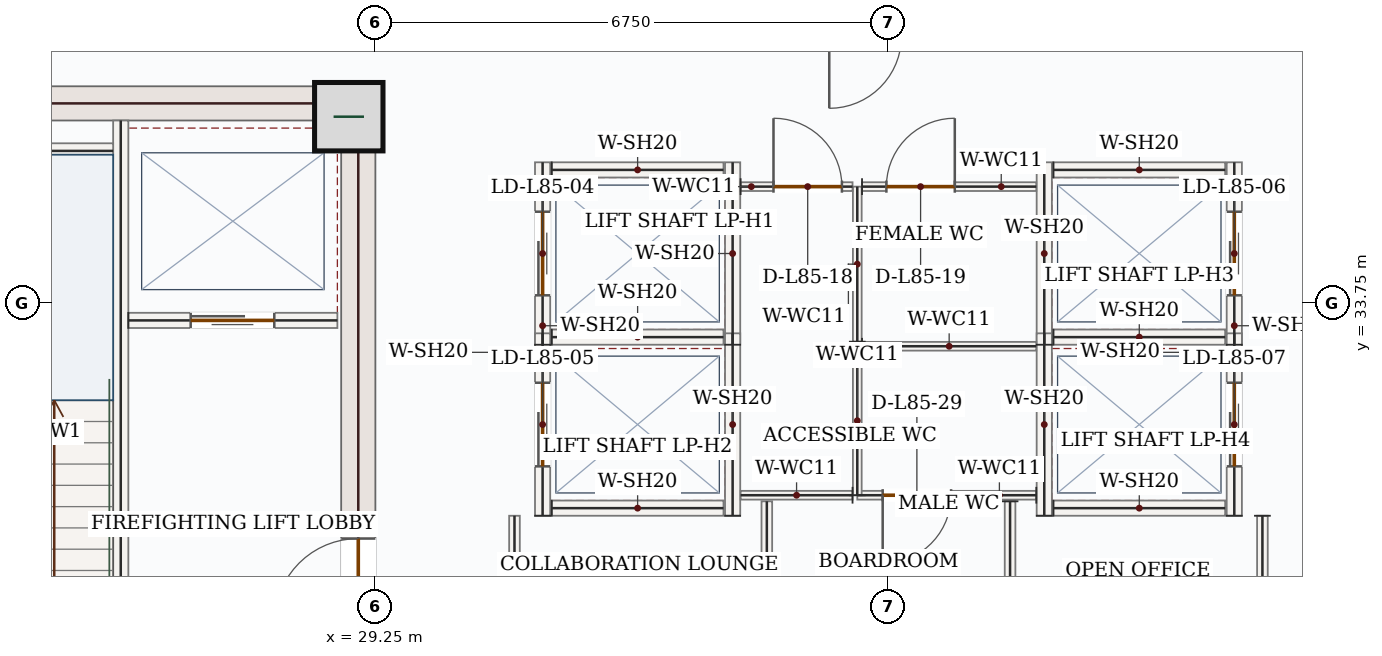
"""IFC4 building model, lengths in metres.
Left out: names, types, materials, properties, quantities, classifications, styles, units other than length and angle.
Written with IfcOpenShell. Run it as: python <this file> out.ifc"""

import sys

from ifc_helpers import new_model, si_unit, direction, frame, frame_2d, origin, origin_2d, place, context, subcontext, project, spatial, rectangle, extrude, source, transform, mapped, element, fill, save


model = new_model("IFC4")
c1 = context("Model", 3, precision=1e-05, world=origin(), true_north=direction((0.0, 1.0)))
c2 = subcontext(c1, "Body", "Model", "MODEL_VIEW")
j1 = project(units=[si_unit("LENGTHUNIT", "METRE"), si_unit("PLANEANGLEUNIT", "RADIAN")], contexts=[c1])
p1 = place(None, origin())
s1 = spatial("IfcSite", under=j1, at=p1, CompositionType="ELEMENT")
p2 = place(p1, origin())
s2 = spatial("IfcBuilding", under=s1, at=p2, CompositionType="ELEMENT")
p3 = place(p2, frame((0.0, 0.0, 349.8)))
s3 = spatial("IfcBuildingStorey", under=s2, at=p3, CompositionType="ELEMENT", Elevation=349.8)
p4 = place(p3, frame((29.025, 28.05, 0.0), z_axis=(0.0, 0.0, 1.0), x_axis=(0.0, 1.0, 0.0)))
e1 = element("IfcWall", 1, at=p4, inside=s3, PredefinedType="SHEAR", context=c2, shape_type="SweptSolid", body=[
    extrude(rectangle(XDim=8.55, YDim=0.45, at=frame_2d((4.275, 0.0))), origin(), (0.0, 0.0, 1.0), 3.5),
])
p5 = place(p4, frame((1.5, 0.0, 0.0)))
e2 = element("IfcOpeningElement", 2, at=p5, cuts=e1, PredefinedType="OPENING", context=c2, shape_type="SweptSolid", body=[
    extrude(rectangle(XDim=1.1, YDim=2.2, at=frame_2d((0.55, 1.1))), frame((0.0, 0.235, 0.0), z_axis=(0.0, -1.0, 0.0), x_axis=(1.0, 0.0, 0.0)), (0.0, 0.0, 1.0), 0.47),
])
m1 = source(origin(), c2, "Body", "SweptSolid", [
    extrude(rectangle(XDim=7.1, YDim=0.45, at=frame_2d((3.55, 0.0))), origin(), (0.0, 0.0, 1.0), 3.5),
])
p6 = place(p3, frame((21.7, 36.375, 0.0), z_axis=(0.0, 0.0, 1.0), x_axis=(1.0, 0.0, 0.0)))
e3 = element("IfcWall", 3, at=p6, inside=s3, PredefinedType="SHEAR", context=c2, shape_type="MappedRepresentation", body=[
    mapped(m1, transform((0.0, 0.0, 0.0), x_axis=(1.0, 0.0, 0.0), y_axis=(0.0, 1.0, 0.0), z_axis=(0.0, 0.0, 1.0), scale=1.0)),
])
m2 = source(origin(), c2, "Body", "SweptSolid", [
    extrude(rectangle(XDim=0.9, YDim=0.9, at=origin_2d()), origin(), (0.0, 0.0, 1.0), 3.75),
])
p7 = place(p3, frame((28.9, 36.2, 0.0), z_axis=(0.0, 0.0, 1.0), x_axis=(1.0, 0.0, 0.0)))
e4 = element("IfcColumn", 4, at=p7, inside=s3, PredefinedType="COLUMN", context=c2, shape_type="MappedRepresentation", body=[
    mapped(m2, transform((0.0, 0.0, 0.0), x_axis=(1.0, 0.0, 0.0), y_axis=(0.0, 1.0, 0.0), z_axis=(0.0, 0.0, 1.0), scale=1.0)),
])
p8 = place(p3, frame((25.9, 28.15, 0.0), z_axis=(0.0, 0.0, 1.0), x_axis=(0.0, 1.0, 0.0)))
e5 = element("IfcWall", 5, at=p8, inside=s3, PredefinedType="SOLIDWALL", context=c2, shape_type="SweptSolid", body=[
    extrude(rectangle(XDim=8.0, YDim=0.2, at=frame_2d((4.0, 0.0))), origin(), (0.0, 0.0, 1.0), 3.5),
])
p9 = place(p8, frame((0.4, 0.0, 0.0)))
e6 = element("IfcOpeningElement", 6, at=p9, cuts=e5, PredefinedType="OPENING", context=c2, shape_type="SweptSolid", body=[
    extrude(rectangle(XDim=1.05, YDim=2.15, at=frame_2d((0.525, 1.075))), frame((0.0, 0.11, 0.0), z_axis=(0.0, -1.0, 0.0), x_axis=(1.0, 0.0, 0.0)), (0.0, 0.0, 1.0), 0.22),
])
m3 = source(origin(), c2, "Body", "SweptSolid", [
    extrude(rectangle(XDim=3.25, YDim=0.2, at=frame_2d((1.625, 0.0))), origin(), (0.0, 0.0, 1.0), 3.5),
])
p10 = place(p3, frame((22.55, 35.75, 0.0), z_axis=(0.0, 0.0, 1.0), x_axis=(1.0, 0.0, 0.0)))
e7 = element("IfcWall", 7, at=p10, inside=s3, PredefinedType="SOLIDWALL", context=c2, shape_type="MappedRepresentation", body=[
    mapped(m3, transform((0.0, 0.0, 0.0), x_axis=(1.0, 0.0, 0.0), y_axis=(0.0, 1.0, 0.0), z_axis=(0.0, 0.0, 1.0), scale=1.0)),
])
p11 = place(p3, frame((26.0, 33.52, 0.0), z_axis=(0.0, 0.0, 1.0), x_axis=(1.0, 0.0, 0.0)))
e8 = element("IfcWall", 8, at=p11, inside=s3, PredefinedType="SOLIDWALL", context=c2, shape_type="SweptSolid", body=[
    extrude(rectangle(XDim=2.75, YDim=0.2, at=frame_2d((1.375, 0.0))), origin(), (0.0, 0.0, 1.0), 3.5),
])
p12 = place(p11, frame((0.82, 0.0, 0.0)))
e9 = element("IfcOpeningElement", 9, at=p12, cuts=e8, PredefinedType="OPENING", context=c2, shape_type="SweptSolid", body=[
    extrude(rectangle(XDim=1.1, YDim=2.15, at=frame_2d((0.55, 1.075))), frame((0.0, 0.11, 0.0), z_axis=(0.0, -1.0, 0.0), x_axis=(1.0, 0.0, 0.0)), (0.0, 0.0, 1.0), 0.22),
])
p13 = place(p3, frame((31.45, 33.2, 0.0), z_axis=(0.0, 0.0, 1.0), x_axis=(0.0, 1.0, 0.0)))
e10 = element("IfcWall", 10, at=p13, inside=s3, PredefinedType="SOLIDWALL", context=c2, shape_type="SweptSolid", body=[
    extrude(rectangle(XDim=2.4, YDim=0.2, at=frame_2d((1.2, 0.0))), origin(), (0.0, 0.0, 1.0), 3.5),
])
p14 = place(p13, frame((0.65, 0.0, 0.0)))
e11 = element("IfcOpeningElement", 11, at=p14, cuts=e10, PredefinedType="OPENING", context=c2, shape_type="SweptSolid", body=[
    extrude(rectangle(XDim=1.1, YDim=2.15, at=frame_2d((0.55, 1.075))), frame((0.0, 0.11, 0.0), z_axis=(0.0, -1.0, 0.0), x_axis=(1.0, 0.0, 0.0)), (0.0, 0.0, 1.0), 0.22),
])
m4 = source(origin(), c2, "Body", "SweptSolid", [
    extrude(rectangle(XDim=2.4, YDim=0.2, at=frame_2d((1.2, 0.0))), origin(), (0.0, 0.0, 1.0), 3.5),
])
p15 = place(p3, frame((33.95, 33.2, 0.0), z_axis=(0.0, 0.0, 1.0), x_axis=(0.0, 1.0, 0.0)))
e12 = element("IfcWall", 12, at=p15, inside=s3, PredefinedType="SOLIDWALL", context=c2, shape_type="MappedRepresentation", body=[
    mapped(m4, transform((0.0, 0.0, 0.0), x_axis=(1.0, 0.0, 0.0), y_axis=(0.0, 1.0, 0.0), z_axis=(0.0, 0.0, 1.0), scale=1.0)),
])
m5 = source(origin(), c2, "Body", "SweptSolid", [
    extrude(rectangle(XDim=2.26, YDim=0.2, at=frame_2d((1.13, 0.0))), origin(), (0.0, 0.0, 1.0), 3.5),
])
for number, where, z_axis, x_axis in (
    (13, (31.57, 33.3, 0.0), (0.0, 0.0, 1.0), (1.0, 0.0, 0.0)),
    (14, (31.57, 35.5, 0.0), (0.0, 0.0, 1.0), (1.0, 0.0, 0.0)),
):
    element("IfcWall", number, at=place(p3, frame(where, z_axis=z_axis, x_axis=x_axis)), inside=s3, PredefinedType="SOLIDWALL", context=c2, shape_type="MappedRepresentation", body=[
        mapped(m5, transform((0.0, 0.0, 0.0), x_axis=(1.0, 0.0, 0.0), y_axis=(0.0, 1.0, 0.0), z_axis=(0.0, 0.0, 1.0), scale=1.0)),
    ])
p16 = place(p3, frame((31.45, 30.95, 0.0), z_axis=(0.0, 0.0, 1.0), x_axis=(0.0, 1.0, 0.0)))
e15 = element("IfcWall", 15, at=p16, inside=s3, PredefinedType="SOLIDWALL", context=c2, shape_type="SweptSolid", body=[
    extrude(rectangle(XDim=2.4, YDim=0.2, at=frame_2d((1.2, 0.0))), origin(), (0.0, 0.0, 1.0), 3.5),
])
p17 = place(p16, frame((0.65, 0.0, 0.0)))
e16 = element("IfcOpeningElement", 16, at=p17, cuts=e15, PredefinedType="OPENING", context=c2, shape_type="SweptSolid", body=[
    extrude(rectangle(XDim=1.1, YDim=2.15, at=frame_2d((0.55, 1.075))), frame((0.0, 0.11, 0.0), z_axis=(0.0, -1.0, 0.0), x_axis=(1.0, 0.0, 0.0)), (0.0, 0.0, 1.0), 0.22),
])
p18 = place(p3, frame((33.95, 30.95, 0.0), z_axis=(0.0, 0.0, 1.0), x_axis=(0.0, 1.0, 0.0)))
e17 = element("IfcWall", 17, at=p18, inside=s3, PredefinedType="SOLIDWALL", context=c2, shape_type="MappedRepresentation", body=[
    mapped(m4, transform((0.0, 0.0, 0.0), x_axis=(1.0, 0.0, 0.0), y_axis=(0.0, 1.0, 0.0), z_axis=(0.0, 0.0, 1.0), scale=1.0)),
])
p19 = place(p3, frame((31.57, 31.05, 0.0), z_axis=(0.0, 0.0, 1.0), x_axis=(1.0, 0.0, 0.0)))
e18 = element("IfcWall", 18, at=p19, inside=s3, PredefinedType="SOLIDWALL", context=c2, shape_type="MappedRepresentation", body=[
    mapped(m5, transform((0.0, 0.0, 0.0), x_axis=(1.0, 0.0, 0.0), y_axis=(0.0, 1.0, 0.0), z_axis=(0.0, 0.0, 1.0), scale=1.0)),
])
p20 = place(p3, frame((38.05, 33.2, 0.0), z_axis=(0.0, 0.0, 1.0), x_axis=(0.0, 1.0, 0.0)))
e19 = element("IfcWall", 19, at=p20, inside=s3, PredefinedType="SOLIDWALL", context=c2, shape_type="MappedRepresentation", body=[
    mapped(m4, transform((0.0, 0.0, 0.0), x_axis=(1.0, 0.0, 0.0), y_axis=(0.0, 1.0, 0.0), z_axis=(0.0, 0.0, 1.0), scale=1.0)),
])
p21 = place(p3, frame((40.55, 33.2, 0.0), z_axis=(0.0, 0.0, 1.0), x_axis=(0.0, 1.0, 0.0)))
e20 = element("IfcWall", 20, at=p21, inside=s3, PredefinedType="SOLIDWALL", context=c2, shape_type="SweptSolid", body=[
    extrude(rectangle(XDim=2.4, YDim=0.2, at=frame_2d((1.2, 0.0))), origin(), (0.0, 0.0, 1.0), 3.5),
])
p22 = place(p21, frame((0.65, 0.0, 0.0)))
e21 = element("IfcOpeningElement", 21, at=p22, cuts=e20, PredefinedType="OPENING", context=c2, shape_type="SweptSolid", body=[
    extrude(rectangle(XDim=1.1, YDim=2.15, at=frame_2d((0.55, 1.075))), frame((0.0, 0.11, 0.0), z_axis=(0.0, -1.0, 0.0), x_axis=(1.0, 0.0, 0.0)), (0.0, 0.0, 1.0), 0.22),
])
for number, where, z_axis, x_axis in (
    (22, (38.17, 33.3, 0.0), (0.0, 0.0, 1.0), (1.0, 0.0, 0.0)),
    (23, (38.17, 35.5, 0.0), (0.0, 0.0, 1.0), (1.0, 0.0, 0.0)),
):
    element("IfcWall", number, at=place(p3, frame(where, z_axis=z_axis, x_axis=x_axis)), inside=s3, PredefinedType="SOLIDWALL", context=c2, shape_type="MappedRepresentation", body=[
        mapped(m5, transform((0.0, 0.0, 0.0), x_axis=(1.0, 0.0, 0.0), y_axis=(0.0, 1.0, 0.0), z_axis=(0.0, 0.0, 1.0), scale=1.0)),
    ])
p23 = place(p3, frame((38.05, 30.95, 0.0), z_axis=(0.0, 0.0, 1.0), x_axis=(0.0, 1.0, 0.0)))
e24 = element("IfcWall", 24, at=p23, inside=s3, PredefinedType="SOLIDWALL", context=c2, shape_type="MappedRepresentation", body=[
    mapped(m4, transform((0.0, 0.0, 0.0), x_axis=(1.0, 0.0, 0.0), y_axis=(0.0, 1.0, 0.0), z_axis=(0.0, 0.0, 1.0), scale=1.0)),
])
p24 = place(p3, frame((40.55, 30.95, 0.0), z_axis=(0.0, 0.0, 1.0), x_axis=(0.0, 1.0, 0.0)))
e25 = element("IfcWall", 25, at=p24, inside=s3, PredefinedType="SOLIDWALL", context=c2, shape_type="SweptSolid", body=[
    extrude(rectangle(XDim=2.4, YDim=0.2, at=frame_2d((1.2, 0.0))), origin(), (0.0, 0.0, 1.0), 3.5),
])
p25 = place(p24, frame((0.65, 0.0, 0.0)))
e26 = element("IfcOpeningElement", 26, at=p25, cuts=e25, PredefinedType="OPENING", context=c2, shape_type="SweptSolid", body=[
    extrude(rectangle(XDim=1.1, YDim=2.15, at=frame_2d((0.55, 1.075))), frame((0.0, 0.11, 0.0), z_axis=(0.0, -1.0, 0.0), x_axis=(1.0, 0.0, 0.0)), (0.0, 0.0, 1.0), 0.22),
])
p26 = place(p3, frame((38.17, 31.05, 0.0), z_axis=(0.0, 0.0, 1.0), x_axis=(1.0, 0.0, 0.0)))
e27 = element("IfcWall", 27, at=p26, inside=s3, PredefinedType="SOLIDWALL", context=c2, shape_type="MappedRepresentation", body=[
    mapped(m5, transform((0.0, 0.0, 0.0), x_axis=(1.0, 0.0, 0.0), y_axis=(0.0, 1.0, 0.0), z_axis=(0.0, 0.0, 1.0), scale=1.0)),
])
p27 = place(p3, frame((37.945, 31.22, 0.0), z_axis=(0.0, 0.0, 1.0), x_axis=(-1.0, 0.0, 0.0)))
e28 = element("IfcWall", 28, at=p27, inside=s3, PredefinedType="PARTITIONING", context=c2, shape_type="SweptSolid", body=[
    extrude(rectangle(XDim=2.355, YDim=0.115, at=frame_2d((1.177, 0.0))), origin(), (0.0, 0.0, 1.0), 3.5),
])
p28 = place(p27, frame((1.121, 0.0, 0.0)))
e29 = element("IfcOpeningElement", 29, at=p28, cuts=e28, PredefinedType="OPENING", context=c2, shape_type="SweptSolid", body=[
    extrude(rectangle(XDim=0.9, YDim=2.1, at=frame_2d((0.45, 1.05))), frame((0.0, 0.067, 0.0), z_axis=(0.0, -1.0, 0.0), x_axis=(1.0, 0.0, 0.0)), (0.0, 0.0, 1.0), 0.135),
])
m6 = source(origin(), c2, "Body", "SweptSolid", [
    extrude(rectangle(XDim=1.96, YDim=0.115, at=frame_2d((0.98, 0.0))), origin(), (0.0, 0.0, 1.0), 3.5),
])
p29 = place(p3, frame((35.59, 31.22, 0.0), z_axis=(0.0, 0.0, 1.0), x_axis=(0.0, 1.0, 0.0)))
e30 = element("IfcWall", 30, at=p29, inside=s3, PredefinedType="PARTITIONING", context=c2, shape_type="MappedRepresentation", body=[
    mapped(m6, transform((0.0, 0.0, 0.0), x_axis=(1.0, 0.0, 0.0), y_axis=(0.0, 1.0, 0.0), z_axis=(0.0, 0.0, 1.0), scale=1.0)),
])
m7 = source(origin(), c2, "Body", "SweptSolid", [
    extrude(rectangle(XDim=2.292, YDim=0.115, at=frame_2d((1.146, 0.0))), origin(), (0.0, 0.0, 1.0), 3.5),
])
p30 = place(p3, frame((35.653, 33.18, 0.0), z_axis=(0.0, 0.0, 1.0), x_axis=(1.0, 0.0, 0.0)))
e31 = element("IfcWall", 31, at=p30, inside=s3, PredefinedType="PARTITIONING", context=c2, shape_type="MappedRepresentation", body=[
    mapped(m7, transform((0.0, 0.0, 0.0), x_axis=(1.0, 0.0, 0.0), y_axis=(0.0, 1.0, 0.0), z_axis=(0.0, 0.0, 1.0), scale=1.0)),
])
m8 = source(origin(), c2, "Body", "SweptSolid", [
    extrude(rectangle(XDim=2.04, YDim=0.115, at=frame_2d((1.02, 0.0))), origin(), (0.0, 0.0, 1.0), 3.5),
])
p31 = place(p3, frame((35.59, 33.24, 0.0), z_axis=(0.0, 0.0, 1.0), x_axis=(0.0, 1.0, 0.0)))
e32 = element("IfcWall", 32, at=p31, inside=s3, PredefinedType="PARTITIONING", context=c2, shape_type="MappedRepresentation", body=[
    mapped(m8, transform((0.0, 0.0, 0.0), x_axis=(1.0, 0.0, 0.0), y_axis=(0.0, 1.0, 0.0), z_axis=(0.0, 0.0, 1.0), scale=1.0)),
])
p32 = place(p3, frame((35.653, 35.28, 0.0), z_axis=(0.0, 0.0, 1.0), x_axis=(1.0, 0.0, 0.0)))
e33 = element("IfcWall", 33, at=p32, inside=s3, PredefinedType="PARTITIONING", context=c2, shape_type="SweptSolid", body=[
    extrude(rectangle(XDim=2.292, YDim=0.115, at=frame_2d((1.146, 0.0))), origin(), (0.0, 0.0, 1.0), 3.5),
])
p33 = place(p32, frame((0.32, 0.0, 0.0)))
e34 = element("IfcOpeningElement", 34, at=p33, cuts=e33, PredefinedType="OPENING", context=c2, shape_type="SweptSolid", body=[
    extrude(rectangle(XDim=0.9, YDim=2.1, at=frame_2d((0.45, 1.05))), frame((0.0, 0.067, 0.0), z_axis=(0.0, -1.0, 0.0), x_axis=(1.0, 0.0, 0.0)), (0.0, 0.0, 1.0), 0.135),
])
m9 = source(origin(), c2, "Body", "SweptSolid", [
    extrude(rectangle(XDim=1.473, YDim=0.115, at=frame_2d((0.736, 0.0))), origin(), (0.0, 0.0, 1.0), 3.5),
])
p34 = place(p3, frame((35.528, 31.22, 0.0), z_axis=(0.0, 0.0, 1.0), x_axis=(-1.0, 0.0, 0.0)))
e35 = element("IfcWall", 35, at=p34, inside=s3, PredefinedType="PARTITIONING", context=c2, shape_type="MappedRepresentation", body=[
    mapped(m9, transform((0.0, 0.0, 0.0), x_axis=(1.0, 0.0, 0.0), y_axis=(0.0, 1.0, 0.0), z_axis=(0.0, 0.0, 1.0), scale=1.0)),
])
p35 = place(p3, frame((34.055, 35.28, 0.0), z_axis=(0.0, 0.0, 1.0), x_axis=(1.0, 0.0, 0.0)))
e36 = element("IfcWall", 36, at=p35, inside=s3, PredefinedType="PARTITIONING", context=c2, shape_type="SweptSolid", body=[
    extrude(rectangle(XDim=1.473, YDim=0.115, at=frame_2d((0.736, 0.0))), origin(), (0.0, 0.0, 1.0), 3.5),
])
p36 = place(p35, frame((0.433, 0.0, 0.0)))
e37 = element("IfcOpeningElement", 37, at=p36, cuts=e36, PredefinedType="OPENING", context=c2, shape_type="SweptSolid", body=[
    extrude(rectangle(XDim=0.9, YDim=2.1, at=frame_2d((0.45, 1.05))), frame((0.0, 0.067, 0.0), z_axis=(0.0, -1.0, 0.0), x_axis=(1.0, 0.0, 0.0)), (0.0, 0.0, 1.0), 0.135),
])
m10 = source(origin(), c2, "Body", "SweptSolid", [
    extrude(rectangle(XDim=3.2, YDim=0.14, at=frame_2d((1.6, 0.0))), origin(), (0.0, 0.0, 1.0), 3.5),
])
for number, where, z_axis, x_axis in (
    (38, (34.4, 27.94, 0.0), (0.0, 0.0, 1.0), (0.0, 1.0, 0.0)),
    (39, (37.6, 31.14, 0.0), (0.0, 0.0, 1.0), (0.0, -1.0, 0.0)),
):
    element("IfcWall", number, at=place(p3, frame(where, z_axis=z_axis, x_axis=x_axis)), inside=s3, PredefinedType="PARTITIONING", context=c2, shape_type="MappedRepresentation", body=[
        mapped(m10, transform((0.0, 0.0, 0.0), x_axis=(1.0, 0.0, 0.0), y_axis=(0.0, 1.0, 0.0), z_axis=(0.0, 0.0, 1.0), scale=1.0)),
    ])
m11 = source(origin(), c2, "Body", "SweptSolid", [
    extrude(rectangle(XDim=2.935, YDim=0.14, at=frame_2d((1.468, 0.0))), origin(), (0.0, 0.0, 1.0), 3.5),
])
p37 = place(p3, frame((31.08, 28.015, 0.0), z_axis=(0.0, 0.0, 1.0), x_axis=(0.0, 1.0, 0.0)))
e40 = element("IfcWall", 40, at=p37, inside=s3, PredefinedType="PARTITIONING", context=c2, shape_type="MappedRepresentation", body=[
    mapped(m11, transform((0.0, 0.0, 0.0), x_axis=(1.0, 0.0, 0.0), y_axis=(0.0, 1.0, 0.0), z_axis=(0.0, 0.0, 1.0), scale=1.0)),
])
m12 = source(origin(), c2, "Body", "SweptSolid", [
    extrude(rectangle(XDim=3.01, YDim=0.14, at=frame_2d((1.505, 0.0))), origin(), (0.0, 0.0, 1.0), 3.5),
])
p38 = place(p3, frame((40.92, 30.95, 0.0), z_axis=(0.0, 0.0, 1.0), x_axis=(0.0, -1.0, 0.0)))
e41 = element("IfcWall", 41, at=p38, inside=s3, PredefinedType="PARTITIONING", context=c2, shape_type="MappedRepresentation", body=[
    mapped(m12, transform((0.0, 0.0, 0.0), x_axis=(1.0, 0.0, 0.0), y_axis=(0.0, 1.0, 0.0), z_axis=(0.0, 0.0, 1.0), scale=1.0)),
])
m13 = source(origin(), c2, "Body", "SweptSolid", [
    extrude(rectangle(XDim=1.1, YDim=2.15, at=frame_2d((0.55, 1.075))), frame((0.0, 0.025, 0.0), z_axis=(0.0, -1.0, 0.0), x_axis=(1.0, 0.0, 0.0)), (0.0, 0.0, 1.0), 0.05),
])
p39 = place(p12, origin())
e42 = element("IfcDoor", 42, at=p39, inside=s3, OperationType="DOUBLE_DOOR_SLIDING", PredefinedType="DOOR", context=c2, shape_type="MappedRepresentation", body=[
    mapped(m13, transform((0.0, 0.0, 0.0), x_axis=(1.0, 0.0, 0.0), y_axis=(0.0, 1.0, 0.0), z_axis=(0.0, 0.0, 1.0), scale=1.0)),
])
fill(e9, e42)
m14 = source(origin(), c2, "Body", "SweptSolid", [
    extrude(rectangle(XDim=1.1, YDim=2.2, at=frame_2d((0.55, 1.1))), frame((0.0, 0.025, 0.0), z_axis=(0.0, -1.0, 0.0), x_axis=(1.0, 0.0, 0.0)), (0.0, 0.0, 1.0), 0.05),
])
p40 = place(p5, origin())
e43 = element("IfcDoor", 43, at=p40, inside=s3, OperationType="SINGLE_SWING_LEFT", PredefinedType="DOOR", context=c2, shape_type="MappedRepresentation", body=[
    mapped(m14, transform((0.0, 0.0, 0.0), x_axis=(1.0, 0.0, 0.0), y_axis=(0.0, 1.0, 0.0), z_axis=(0.0, 0.0, 1.0), scale=1.0)),
])
fill(e2, e43)
p41 = place(p14, origin())
e44 = element("IfcDoor", 44, at=p41, inside=s3, OperationType="DOUBLE_DOOR_SLIDING", PredefinedType="DOOR", context=c2, shape_type="MappedRepresentation", body=[
    mapped(m13, transform((0.0, 0.0, 0.0), x_axis=(1.0, 0.0, 0.0), y_axis=(0.0, 1.0, 0.0), z_axis=(0.0, 0.0, 1.0), scale=1.0)),
])
fill(e11, e44)
p42 = place(p17, origin())
e45 = element("IfcDoor", 45, at=p42, inside=s3, OperationType="DOUBLE_DOOR_SLIDING", PredefinedType="DOOR", context=c2, shape_type="MappedRepresentation", body=[
    mapped(m13, transform((0.0, 0.0, 0.0), x_axis=(1.0, 0.0, 0.0), y_axis=(0.0, 1.0, 0.0), z_axis=(0.0, 0.0, 1.0), scale=1.0)),
])
fill(e16, e45)
p43 = place(p22, origin())
e46 = element("IfcDoor", 46, at=p43, inside=s3, OperationType="DOUBLE_DOOR_SLIDING", PredefinedType="DOOR", context=c2, shape_type="MappedRepresentation", body=[
    mapped(m13, transform((0.0, 0.0, 0.0), x_axis=(1.0, 0.0, 0.0), y_axis=(0.0, 1.0, 0.0), z_axis=(0.0, 0.0, 1.0), scale=1.0)),
])
fill(e21, e46)
p44 = place(p25, origin())
e47 = element("IfcDoor", 47, at=p44, inside=s3, OperationType="DOUBLE_DOOR_SLIDING", PredefinedType="DOOR", context=c2, shape_type="MappedRepresentation", body=[
    mapped(m13, transform((0.0, 0.0, 0.0), x_axis=(1.0, 0.0, 0.0), y_axis=(0.0, 1.0, 0.0), z_axis=(0.0, 0.0, 1.0), scale=1.0)),
])
fill(e26, e47)
m15 = source(origin(), c2, "Body", "SweptSolid", [
    extrude(rectangle(XDim=0.9, YDim=2.1, at=frame_2d((0.45, 1.05))), frame((0.0, 0.025, 0.0), z_axis=(0.0, -1.0, 0.0), x_axis=(1.0, 0.0, 0.0)), (0.0, 0.0, 1.0), 0.05),
])
p45 = place(p36, origin())
e48 = element("IfcDoor", 48, at=p45, inside=s3, OperationType="SINGLE_SWING_LEFT", PredefinedType="DOOR", context=c2, shape_type="MappedRepresentation", body=[
    mapped(m15, transform((0.0, 0.0, 0.0), x_axis=(1.0, 0.0, 0.0), y_axis=(0.0, 1.0, 0.0), z_axis=(0.0, 0.0, 1.0), scale=1.0)),
])
fill(e37, e48)
p46 = place(p33, origin())
e49 = element("IfcDoor", 49, at=p46, inside=s3, OperationType="SINGLE_SWING_RIGHT", PredefinedType="DOOR", context=c2, shape_type="MappedRepresentation", body=[
    mapped(m15, transform((0.0, 0.0, 0.0), x_axis=(1.0, 0.0, 0.0), y_axis=(0.0, 1.0, 0.0), z_axis=(0.0, 0.0, 1.0), scale=1.0)),
])
fill(e34, e49)
p47 = place(p28, origin())
e50 = element("IfcDoor", 50, at=p47, inside=s3, OperationType="SINGLE_SWING_RIGHT", PredefinedType="DOOR", context=c2, shape_type="MappedRepresentation", body=[
    mapped(m15, transform((0.0, 0.0, 0.0), x_axis=(1.0, 0.0, 0.0), y_axis=(0.0, 1.0, 0.0), z_axis=(0.0, 0.0, 1.0), scale=1.0)),
])
fill(e29, e50)
save(model, sys.argv[1])
